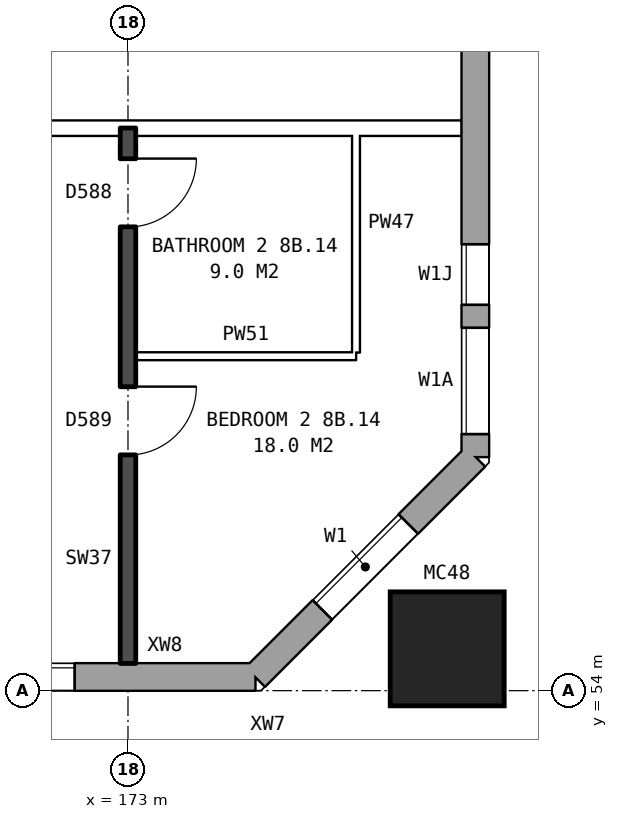
"""IFC4 building model, lengths in metres.
Left out: names, types, materials, properties, quantities, classifications, styles, units other than length and angle.
Written with IfcOpenShell. Run it as: python <this file> out.ifc"""

import sys

from ifc_helpers import new_model, si_unit, direction, frame, frame_2d, origin, origin_2d, place, context, subcontext, project, spatial, rectangle, hollow_rectangle, extrude, element, fill, save


model = new_model("IFC4")
c1 = context("Model", 3, precision=1e-05, world=origin(), true_north=direction((0.0, 1.0)))
c2 = subcontext(c1, "Body", "Model", "MODEL_VIEW")
j1 = project(units=[si_unit("LENGTHUNIT", "METRE"), si_unit("PLANEANGLEUNIT", "RADIAN")], contexts=[c1])
p1 = place(None, origin())
s1 = spatial("IfcSite", under=j1, at=p1, CompositionType="ELEMENT")
p2 = place(p1, origin())
s2 = spatial("IfcBuilding", under=s1, at=p2, CompositionType="ELEMENT")
p3 = place(p2, frame((0.0, 0.0, 31.9)))
s3 = spatial("IfcBuildingStorey", under=s2, at=p3, CompositionType="ELEMENT", Elevation=31.9)
p4 = place(p3, frame((177.2, 54.55, 0.0), z_axis=(0.0, 0.0, 1.0), x_axis=(1.0, 0.0, 0.0)))
e1 = element("IfcColumn", 1, at=p4, inside=s3, PredefinedType="COLUMN", context=c2, shape_type="SweptSolid", body=[
    extrude(hollow_rectangle(XDim=1.5, YDim=1.5, WallThickness=0.08, at=origin_2d()), origin(), (0.0, 0.0, 1.0), 3.1),
])
p5 = place(p3, frame((134.075, 54.18, 0.0), z_axis=(0.0, 0.0, 1.0), x_axis=(1.0, 0.0, 0.0)))
e2 = element("IfcWall", 2, at=p5, inside=s3, PredefinedType="STANDARD", context=c2, shape_type="SweptSolid", body=[
    extrude(rectangle(XDim=40.601, YDim=0.36, at=frame_2d((20.3, 0.0))), origin(), (0.0, 0.0, 1.0), 2.85),
])
p6 = place(p5, frame((0.625, 0.0, 0.8)))
e3 = element("IfcOpeningElement", 3, at=p6, cuts=e2, PredefinedType="OPENING", context=c2, shape_type="SweptSolid", body=[
    extrude(rectangle(XDim=1.6, YDim=1.8, at=frame_2d((0.8, 0.9))), frame((0.0, 0.19, 0.0), z_axis=(0.0, -1.0, 0.0), x_axis=(1.0, 0.0, 0.0)), (0.0, 0.0, 1.0), 0.38),
])
p7 = place(p5, frame((3.625, 0.0, 0.8)))
e4 = element("IfcOpeningElement", 4, at=p7, cuts=e2, PredefinedType="OPENING", context=c2, shape_type="SweptSolid", body=[
    extrude(rectangle(XDim=1.6, YDim=1.8, at=frame_2d((0.8, 0.9))), frame((0.0, 0.19, 0.0), z_axis=(0.0, -1.0, 0.0), x_axis=(1.0, 0.0, 0.0)), (0.0, 0.0, 1.0), 0.38),
])
p8 = place(p5, frame((6.625, 0.0, 0.8)))
e5 = element("IfcOpeningElement", 5, at=p8, cuts=e2, PredefinedType="OPENING", context=c2, shape_type="SweptSolid", body=[
    extrude(rectangle(XDim=1.6, YDim=1.8, at=frame_2d((0.8, 0.9))), frame((0.0, 0.19, 0.0), z_axis=(0.0, -1.0, 0.0), x_axis=(1.0, 0.0, 0.0)), (0.0, 0.0, 1.0), 0.38),
])
p9 = place(p5, frame((9.625, 0.0, 0.8)))
e6 = element("IfcOpeningElement", 6, at=p9, cuts=e2, PredefinedType="OPENING", context=c2, shape_type="SweptSolid", body=[
    extrude(rectangle(XDim=1.6, YDim=1.8, at=frame_2d((0.8, 0.9))), frame((0.0, 0.19, 0.0), z_axis=(0.0, -1.0, 0.0), x_axis=(1.0, 0.0, 0.0)), (0.0, 0.0, 1.0), 0.38),
])
p10 = place(p5, frame((12.075, 0.0, 0.8)))
e7 = element("IfcOpeningElement", 7, at=p10, cuts=e2, PredefinedType="OPENING", context=c2, shape_type="SweptSolid", body=[
    extrude(rectangle(XDim=1.2, YDim=1.8, at=frame_2d((0.6, 0.9))), frame((0.0, 0.19, 0.0), z_axis=(0.0, -1.0, 0.0), x_axis=(1.0, 0.0, 0.0)), (0.0, 0.0, 1.0), 0.38),
])
p11 = place(p5, frame((15.575, 0.0, 0.65)))
e8 = element("IfcOpeningElement", 8, at=p11, cuts=e2, PredefinedType="OPENING", context=c2, shape_type="SweptSolid", body=[
    extrude(rectangle(XDim=0.8, YDim=0.9, at=frame_2d((0.4, 0.45))), frame((0.0, 0.19, 0.0), z_axis=(0.0, -1.0, 0.0), x_axis=(1.0, 0.0, 0.0)), (0.0, 0.0, 1.0), 0.38),
])
p12 = place(p5, frame((18.625, 0.0, 0.8)))
e9 = element("IfcOpeningElement", 9, at=p12, cuts=e2, PredefinedType="OPENING", context=c2, shape_type="SweptSolid", body=[
    extrude(rectangle(XDim=1.6, YDim=1.8, at=frame_2d((0.8, 0.9))), frame((0.0, 0.19, 0.0), z_axis=(0.0, -1.0, 0.0), x_axis=(1.0, 0.0, 0.0)), (0.0, 0.0, 1.0), 0.38),
])
p13 = place(p5, frame((21.625, 0.0, 0.8)))
e10 = element("IfcOpeningElement", 10, at=p13, cuts=e2, PredefinedType="OPENING", context=c2, shape_type="SweptSolid", body=[
    extrude(rectangle(XDim=1.6, YDim=1.8, at=frame_2d((0.8, 0.9))), frame((0.0, 0.19, 0.0), z_axis=(0.0, -1.0, 0.0), x_axis=(1.0, 0.0, 0.0)), (0.0, 0.0, 1.0), 0.38),
])
p14 = place(p5, frame((23.525, 0.0, 0.8)))
e11 = element("IfcOpeningElement", 11, at=p14, cuts=e2, PredefinedType="OPENING", context=c2, shape_type="SweptSolid", body=[
    extrude(rectangle(XDim=1.2, YDim=0.9, at=frame_2d((0.6, 0.45))), frame((0.0, 0.19, 0.0), z_axis=(0.0, -1.0, 0.0), x_axis=(1.0, 0.0, 0.0)), (0.0, 0.0, 1.0), 0.38),
])
p15 = place(p5, frame((27.625, 0.0, 0.8)))
e12 = element("IfcOpeningElement", 12, at=p15, cuts=e2, PredefinedType="OPENING", context=c2, shape_type="SweptSolid", body=[
    extrude(rectangle(XDim=1.6, YDim=1.8, at=frame_2d((0.8, 0.9))), frame((0.0, 0.19, 0.0), z_axis=(0.0, -1.0, 0.0), x_axis=(1.0, 0.0, 0.0)), (0.0, 0.0, 1.0), 0.38),
])
p16 = place(p5, frame((30.625, 0.0, 0.8)))
e13 = element("IfcOpeningElement", 13, at=p16, cuts=e2, PredefinedType="OPENING", context=c2, shape_type="SweptSolid", body=[
    extrude(rectangle(XDim=1.6, YDim=1.8, at=frame_2d((0.8, 0.9))), frame((0.0, 0.19, 0.0), z_axis=(0.0, -1.0, 0.0), x_axis=(1.0, 0.0, 0.0)), (0.0, 0.0, 1.0), 0.38),
])
p17 = place(p5, frame((33.625, 0.0, 0.8)))
e14 = element("IfcOpeningElement", 14, at=p17, cuts=e2, PredefinedType="OPENING", context=c2, shape_type="SweptSolid", body=[
    extrude(rectangle(XDim=1.6, YDim=1.8, at=frame_2d((0.8, 0.9))), frame((0.0, 0.19, 0.0), z_axis=(0.0, -1.0, 0.0), x_axis=(1.0, 0.0, 0.0)), (0.0, 0.0, 1.0), 0.38),
])
p18 = place(p5, frame((36.625, 0.0, 0.8)))
e15 = element("IfcOpeningElement", 15, at=p18, cuts=e2, PredefinedType="OPENING", context=c2, shape_type="SweptSolid", body=[
    extrude(rectangle(XDim=1.6, YDim=1.8, at=frame_2d((0.8, 0.9))), frame((0.0, 0.19, 0.0), z_axis=(0.0, -1.0, 0.0), x_axis=(1.0, 0.0, 0.0)), (0.0, 0.0, 1.0), 0.38),
])
p19 = place(p5, frame((13.575, 0.0, 1.4)))
e16 = element("IfcOpeningElement", 16, at=p19, cuts=e2, PredefinedType="OPENING", context=c2, shape_type="SweptSolid", body=[
    extrude(rectangle(XDim=0.6, YDim=1.2, at=frame_2d((0.3, 0.6))), frame((0.0, 0.19, 0.0), z_axis=(0.0, -1.0, 0.0), x_axis=(1.0, 0.0, 0.0)), (0.0, 0.0, 1.0), 0.38),
])
p20 = place(p5, frame((16.725, 0.0, 0.65)))
e17 = element("IfcOpeningElement", 17, at=p20, cuts=e2, PredefinedType="OPENING", context=c2, shape_type="SweptSolid", body=[
    extrude(rectangle(XDim=1.0, YDim=1.8, at=frame_2d((0.5, 0.9))), frame((0.0, 0.19, 0.0), z_axis=(0.0, -1.0, 0.0), x_axis=(1.0, 0.0, 0.0)), (0.0, 0.0, 1.0), 0.38),
])
p21 = place(p5, frame((26.075, 0.0, 1.7)))
e18 = element("IfcOpeningElement", 18, at=p21, cuts=e2, PredefinedType="OPENING", context=c2, shape_type="SweptSolid", body=[
    extrude(rectangle(XDim=0.6, YDim=0.9, at=frame_2d((0.3, 0.45))), frame((0.0, 0.19, 0.0), z_axis=(0.0, -1.0, 0.0), x_axis=(1.0, 0.0, 0.0)), (0.0, 0.0, 1.0), 0.38),
])
p22 = place(p3, frame((174.675, 54.18, 0.0), z_axis=(0.0, 0.0, 1.0), x_axis=(0.707106781187, 0.707106781187, 0.0)))
e19 = element("IfcWall", 19, at=p22, inside=s3, PredefinedType="STANDARD", context=c2, shape_type="SweptSolid", body=[
    extrude(rectangle(XDim=4.094, YDim=0.36, at=frame_2d((2.047, 0.0))), origin(), (0.0, 0.0, 1.0), 2.85),
])
p23 = place(p22, frame((1.247, 0.0, 0.8)))
e20 = element("IfcOpeningElement", 20, at=p23, cuts=e19, PredefinedType="OPENING", context=c2, shape_type="SweptSolid", body=[
    extrude(rectangle(XDim=1.6, YDim=1.8, at=frame_2d((0.8, 0.9))), frame((0.0, 0.19, 0.0), z_axis=(0.0, -1.0, 0.0), x_axis=(1.0, 0.0, 0.0)), (0.0, 0.0, 1.0), 0.38),
])
p24 = place(p3, frame((177.57, 57.075, 0.0), z_axis=(0.0, 0.0, 1.0), x_axis=(0.0, 1.0, 0.0)))
e21 = element("IfcWall", 21, at=p24, inside=s3, PredefinedType="STANDARD", context=c2, shape_type="SweptSolid", body=[
    extrude(rectangle(XDim=25.851, YDim=0.36, at=frame_2d((12.925, 0.0))), origin(), (0.0, 0.0, 1.0), 2.85),
])
p25 = place(p24, frame((0.3, 0.0, 0.8)))
e22 = element("IfcOpeningElement", 22, at=p25, cuts=e21, PredefinedType="OPENING", context=c2, shape_type="SweptSolid", body=[
    extrude(rectangle(XDim=1.4, YDim=1.8, at=frame_2d((0.7, 0.9))), frame((0.0, 0.19, 0.0), z_axis=(0.0, -1.0, 0.0), x_axis=(1.0, 0.0, 0.0)), (0.0, 0.0, 1.0), 0.38),
])
p26 = place(p24, frame((5.575, 0.0, 1.4)))
e23 = element("IfcOpeningElement", 23, at=p26, cuts=e21, PredefinedType="OPENING", context=c2, shape_type="SweptSolid", body=[
    extrude(rectangle(XDim=1.6, YDim=1.2, at=frame_2d((0.8, 0.6))), frame((0.0, 0.19, 0.0), z_axis=(0.0, -1.0, 0.0), x_axis=(1.0, 0.0, 0.0)), (0.0, 0.0, 1.0), 0.38),
])
p27 = place(p24, frame((7.625, 0.0, 0.8)))
e24 = element("IfcOpeningElement", 24, at=p27, cuts=e21, PredefinedType="OPENING", context=c2, shape_type="SweptSolid", body=[
    extrude(rectangle(XDim=1.6, YDim=1.8, at=frame_2d((0.8, 0.9))), frame((0.0, 0.19, 0.0), z_axis=(0.0, -1.0, 0.0), x_axis=(1.0, 0.0, 0.0)), (0.0, 0.0, 1.0), 0.38),
])
p28 = place(p24, frame((10.625, 0.0, 0.8)))
e25 = element("IfcOpeningElement", 25, at=p28, cuts=e21, PredefinedType="OPENING", context=c2, shape_type="SweptSolid", body=[
    extrude(rectangle(XDim=1.6, YDim=1.8, at=frame_2d((0.8, 0.9))), frame((0.0, 0.19, 0.0), z_axis=(0.0, -1.0, 0.0), x_axis=(1.0, 0.0, 0.0)), (0.0, 0.0, 1.0), 0.38),
])
p29 = place(p24, frame((13.625, 0.0, 0.8)))
e26 = element("IfcOpeningElement", 26, at=p29, cuts=e21, PredefinedType="OPENING", context=c2, shape_type="SweptSolid", body=[
    extrude(rectangle(XDim=1.6, YDim=1.8, at=frame_2d((0.8, 0.9))), frame((0.0, 0.19, 0.0), z_axis=(0.0, -1.0, 0.0), x_axis=(1.0, 0.0, 0.0)), (0.0, 0.0, 1.0), 0.38),
])
p30 = place(p24, frame((16.625, 0.0, 0.8)))
e27 = element("IfcOpeningElement", 27, at=p30, cuts=e21, PredefinedType="OPENING", context=c2, shape_type="SweptSolid", body=[
    extrude(rectangle(XDim=1.6, YDim=1.8, at=frame_2d((0.8, 0.9))), frame((0.0, 0.19, 0.0), z_axis=(0.0, -1.0, 0.0), x_axis=(1.0, 0.0, 0.0)), (0.0, 0.0, 1.0), 0.38),
])
p31 = place(p24, frame((9.525, 0.0, 0.8)))
e28 = element("IfcOpeningElement", 28, at=p31, cuts=e21, PredefinedType="OPENING", context=c2, shape_type="SweptSolid", body=[
    extrude(rectangle(XDim=0.8, YDim=1.8, at=frame_2d((0.4, 0.9))), frame((0.0, 0.19, 0.0), z_axis=(0.0, -1.0, 0.0), x_axis=(1.0, 0.0, 0.0)), (0.0, 0.0, 1.0), 0.38),
])
p32 = place(p24, frame((22.525, 0.0, 0.8)))
e29 = element("IfcOpeningElement", 29, at=p32, cuts=e21, PredefinedType="OPENING", context=c2, shape_type="SweptSolid", body=[
    extrude(rectangle(XDim=1.0, YDim=1.2, at=frame_2d((0.5, 0.6))), frame((0.0, 0.19, 0.0), z_axis=(0.0, -1.0, 0.0), x_axis=(1.0, 0.0, 0.0)), (0.0, 0.0, 1.0), 0.38),
])
p33 = place(p24, frame((2.0, 0.0, 0.8)))
e30 = element("IfcOpeningElement", 30, at=p33, cuts=e21, PredefinedType="OPENING", context=c2, shape_type="SweptSolid", body=[
    extrude(rectangle(XDim=0.8, YDim=1.5, at=frame_2d((0.4, 0.75))), frame((0.0, 0.19, 0.0), z_axis=(0.0, -1.0, 0.0), x_axis=(1.0, 0.0, 0.0)), (0.0, 0.0, 1.0), 0.38),
])
p34 = place(p24, frame((12.525, 0.0, 0.8)))
e31 = element("IfcOpeningElement", 31, at=p34, cuts=e21, PredefinedType="OPENING", context=c2, shape_type="SweptSolid", body=[
    extrude(rectangle(XDim=0.8, YDim=1.8, at=frame_2d((0.4, 0.9))), frame((0.0, 0.19, 0.0), z_axis=(0.0, -1.0, 0.0), x_axis=(1.0, 0.0, 0.0)), (0.0, 0.0, 1.0), 0.38),
])
p35 = place(p24, frame((15.525, 0.0, 0.8)))
e32 = element("IfcOpeningElement", 32, at=p35, cuts=e21, PredefinedType="OPENING", context=c2, shape_type="SweptSolid", body=[
    extrude(rectangle(XDim=0.8, YDim=1.8, at=frame_2d((0.4, 0.9))), frame((0.0, 0.19, 0.0), z_axis=(0.0, -1.0, 0.0), x_axis=(1.0, 0.0, 0.0)), (0.0, 0.0, 1.0), 0.38),
])
p36 = place(p24, frame((18.525, 0.0, 0.9)))
e33 = element("IfcOpeningElement", 33, at=p36, cuts=e21, PredefinedType="OPENING", context=c2, shape_type="SweptSolid", body=[
    extrude(rectangle(XDim=0.8, YDim=1.5, at=frame_2d((0.4, 0.75))), frame((0.0, 0.19, 0.0), z_axis=(0.0, -1.0, 0.0), x_axis=(1.0, 0.0, 0.0)), (0.0, 0.0, 1.0), 0.38),
])
p37 = place(p24, frame((23.825, 0.0, 0.8)))
e34 = element("IfcOpeningElement", 34, at=p37, cuts=e21, PredefinedType="OPENING", context=c2, shape_type="SweptSolid", body=[
    extrude(rectangle(XDim=1.4, YDim=1.8, at=frame_2d((0.7, 0.9))), frame((0.0, 0.19, 0.0), z_axis=(0.0, -1.0, 0.0), x_axis=(1.0, 0.0, 0.0)), (0.0, 0.0, 1.0), 0.38),
])
p38 = place(p3, frame((173.1, 58.4, 0.0), z_axis=(0.0, 0.0, 1.0), x_axis=(1.0, 0.0, 0.0)))
e35 = element("IfcWall", 35, at=p38, inside=s3, PredefinedType="PARTITIONING", context=c2, shape_type="SweptSolid", body=[
    extrude(rectangle(XDim=2.9, YDim=0.1, at=frame_2d((1.45, 0.0))), origin(), (0.0, 0.0, 1.0), 2.85),
])
p39 = place(p3, frame((155.1, 61.4, 0.0), z_axis=(0.0, 0.0, 1.0), x_axis=(1.0, 0.0, 0.0)))
e36 = element("IfcWall", 36, at=p39, inside=s3, PredefinedType="PARTITIONING", context=c2, shape_type="SweptSolid", body=[
    extrude(rectangle(XDim=22.29, YDim=0.2, at=frame_2d((11.145, 0.0))), origin(), (0.0, 0.0, 1.0), 2.85),
])
p40 = place(p39, frame((2.45, 0.0, 0.0)))
e37 = element("IfcOpeningElement", 37, at=p40, cuts=e36, PredefinedType="OPENING", context=c2, shape_type="SweptSolid", body=[
    extrude(rectangle(XDim=1.0, YDim=2.1, at=frame_2d((0.5, 1.05))), frame((0.0, 0.11, 0.0), z_axis=(0.0, -1.0, 0.0), x_axis=(1.0, 0.0, 0.0)), (0.0, 0.0, 1.0), 0.22),
])
p41 = place(p39, frame((14.4, 0.0, 0.0)))
e38 = element("IfcOpeningElement", 38, at=p41, cuts=e36, PredefinedType="OPENING", context=c2, shape_type="SweptSolid", body=[
    extrude(rectangle(XDim=1.0, YDim=2.1, at=frame_2d((0.5, 1.05))), frame((0.0, 0.11, 0.0), z_axis=(0.0, -1.0, 0.0), x_axis=(1.0, 0.0, 0.0)), (0.0, 0.0, 1.0), 0.22),
])
p42 = place(p3, frame((173.0, 54.36, 0.0), z_axis=(0.0, 0.0, 1.0), x_axis=(0.0, 1.0, 0.0)))
e39 = element("IfcWall", 39, at=p42, inside=s3, PredefinedType="SOLIDWALL", context=c2, shape_type="SweptSolid", body=[
    extrude(rectangle(XDim=7.04, YDim=0.2, at=frame_2d((3.52, 0.0))), origin(), (0.0, 0.0, 1.0), 2.85),
])
p43 = place(p42, frame((2.74, 0.0, 0.0)))
e40 = element("IfcOpeningElement", 40, at=p43, cuts=e39, PredefinedType="OPENING", context=c2, shape_type="SweptSolid", body=[
    extrude(rectangle(XDim=0.9, YDim=2.1, at=frame_2d((0.45, 1.05))), frame((0.0, 0.11, 0.0), z_axis=(0.0, -1.0, 0.0), x_axis=(1.0, 0.0, 0.0)), (0.0, 0.0, 1.0), 0.22),
])
p44 = place(p42, frame((5.74, 0.0, 0.0)))
e41 = element("IfcOpeningElement", 41, at=p44, cuts=e39, PredefinedType="OPENING", context=c2, shape_type="SweptSolid", body=[
    extrude(rectangle(XDim=0.9, YDim=2.1, at=frame_2d((0.45, 1.05))), frame((0.0, 0.11, 0.0), z_axis=(0.0, -1.0, 0.0), x_axis=(1.0, 0.0, 0.0)), (0.0, 0.0, 1.0), 0.22),
])
p45 = place(p3, frame((176.0, 58.45, 0.0), z_axis=(0.0, 0.0, 1.0), x_axis=(0.0, 1.0, 0.0)))
e42 = element("IfcWall", 42, at=p45, inside=s3, PredefinedType="PARTITIONING", context=c2, shape_type="SweptSolid", body=[
    extrude(rectangle(XDim=2.85, YDim=0.1, at=frame_2d((1.425, 0.0))), origin(), (0.0, 0.0, 1.0), 2.85),
])
p46 = place(p18, origin())
e43 = element("IfcWindow", 43, at=p46, inside=s3, PartitioningType="SINGLE_PANEL", PredefinedType="WINDOW", context=c2, shape_type="SweptSolid", body=[
    extrude(rectangle(XDim=1.6, YDim=1.8, at=frame_2d((0.8, 0.9))), frame((0.0, 0.15, 0.0), z_axis=(0.0, -1.0, 0.0), x_axis=(1.0, 0.0, 0.0)), (0.0, 0.0, 1.0), 0.06),
])
fill(e15, e43)
p47 = place(p23, origin())
e44 = element("IfcWindow", 44, at=p47, inside=s3, PartitioningType="SINGLE_PANEL", PredefinedType="WINDOW", context=c2, shape_type="SweptSolid", body=[
    extrude(rectangle(XDim=1.6, YDim=1.8, at=frame_2d((0.8, 0.9))), frame((0.0, 0.15, 0.0), z_axis=(0.0, -1.0, 0.0), x_axis=(1.0, 0.0, 0.0)), (0.0, 0.0, 1.0), 0.06),
])
fill(e20, e44)
p48 = place(p25, origin())
e45 = element("IfcWindow", 45, at=p48, inside=s3, PartitioningType="SINGLE_PANEL", PredefinedType="WINDOW", context=c2, shape_type="SweptSolid", body=[
    extrude(rectangle(XDim=1.4, YDim=1.8, at=frame_2d((0.7, 0.9))), frame((0.0, 0.15, 0.0), z_axis=(0.0, -1.0, 0.0), x_axis=(1.0, 0.0, 0.0)), (0.0, 0.0, 1.0), 0.06),
])
fill(e22, e45)
p49 = place(p43, frame((0.9, 0.0, 0.0), z_axis=(0.0, 0.0, 1.0), x_axis=(-1.0, 0.0, 0.0)))
e46 = element("IfcDoor", 46, at=p49, inside=s3, OperationType="SINGLE_SWING_LEFT", PredefinedType="DOOR", context=c2, shape_type="SweptSolid", body=[
    extrude(rectangle(XDim=0.9, YDim=2.1, at=frame_2d((0.45, 1.05))), frame((0.0, 0.025, 0.0), z_axis=(0.0, -1.0, 0.0), x_axis=(1.0, 0.0, 0.0)), (0.0, 0.0, 1.0), 0.05),
])
fill(e40, e46)
p50 = place(p44, frame((0.9, 0.0, 0.0), z_axis=(0.0, 0.0, 1.0), x_axis=(-1.0, 0.0, 0.0)))
e47 = element("IfcDoor", 47, at=p50, inside=s3, OperationType="SINGLE_SWING_LEFT", PredefinedType="DOOR", context=c2, shape_type="SweptSolid", body=[
    extrude(rectangle(XDim=0.9, YDim=2.1, at=frame_2d((0.45, 1.05))), frame((0.0, 0.025, 0.0), z_axis=(0.0, -1.0, 0.0), x_axis=(1.0, 0.0, 0.0)), (0.0, 0.0, 1.0), 0.05),
])
fill(e41, e47)
p51 = place(p33, origin())
e48 = element("IfcWindow", 48, at=p51, inside=s3, PartitioningType="SINGLE_PANEL", PredefinedType="WINDOW", context=c2, shape_type="SweptSolid", body=[
    extrude(rectangle(XDim=0.8, YDim=1.5, at=frame_2d((0.4, 0.75))), frame((0.0, 0.15, 0.0), z_axis=(0.0, -1.0, 0.0), x_axis=(1.0, 0.0, 0.0)), (0.0, 0.0, 1.0), 0.06),
])
fill(e30, e48)
save(model, sys.argv[1])
